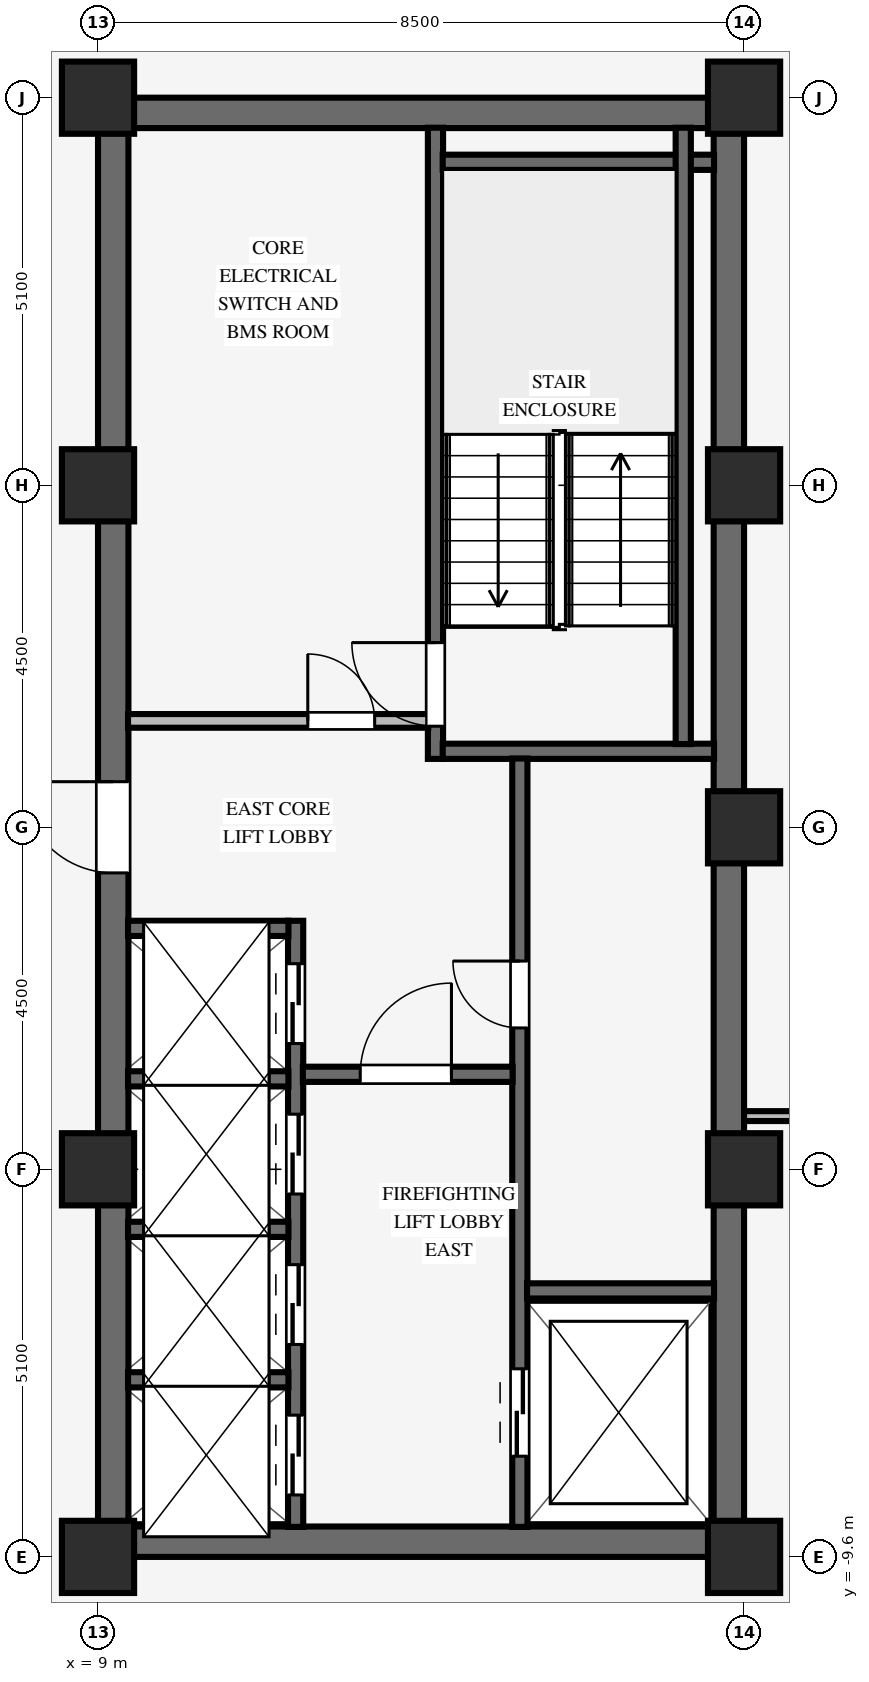
"""IFC4 building model, lengths in metres.
Left out: names, types, materials, properties, quantities, classifications, styles, units other than length and angle.
Written with IfcOpenShell. Run it as: python <this file> out.ifc"""

import sys

from ifc_helpers import new_model, si_unit, direction, frame, frame_2d, origin, origin_2d, place, context, subcontext, project, spatial, rectangle, extrude, source, transform, mapped, element, fill, save


model = new_model("IFC4")
c1 = context("Model", 3, precision=1e-05, world=origin(), true_north=direction((0.0, 1.0)))
c2 = subcontext(c1, "Body", "Model", "MODEL_VIEW")
j1 = project(units=[si_unit("LENGTHUNIT", "METRE"), si_unit("PLANEANGLEUNIT", "RADIAN")], contexts=[c1])
p1 = place(None, origin())
s1 = spatial("IfcSite", under=j1, at=p1, CompositionType="ELEMENT")
p2 = place(p1, origin())
s2 = spatial("IfcBuilding", under=s1, at=p2, CompositionType="ELEMENT")
p3 = place(p2, frame((0.0, 0.0, 178.6)))
s3 = spatial("IfcBuildingStorey", under=s2, at=p3, CompositionType="ELEMENT", Elevation=178.6)
for number, where, z_axis, x_axis in (
    (1, (9.0, -9.4, 0.0), (0.0, 0.0, 1.0), (1.0, 0.0, 0.0)),
    (2, (9.0, 9.4, 0.0), (0.0, 0.0, 1.0), (1.0, 0.0, 0.0)),
):
    element("IfcWall", number, at=place(p3, frame(where, z_axis=z_axis, x_axis=x_axis)), inside=s3, PredefinedType="SHEAR", context=c2, shape_type="SweptSolid", body=[
        extrude(rectangle(XDim=8.5, YDim=0.4, at=frame_2d((4.25, 0.0))), origin(), (0.0, 0.0, 1.0), 3.37),
    ])
p4 = place(p3, frame((9.2, -9.205, 0.0), z_axis=(0.0, 0.0, 1.0), x_axis=(0.0, 1.0, 0.0)))
e3 = element("IfcWall", 3, at=p4, inside=s3, PredefinedType="SHEAR", context=c2, shape_type="SweptSolid", body=[
    extrude(rectangle(XDim=18.41, YDim=0.4, at=frame_2d((9.205, 0.0))), origin(), (0.0, 0.0, 1.0), 3.37),
])
p5 = place(p4, frame((8.605, 0.0, 0.0)))
e4 = element("IfcOpeningElement", 4, at=p5, cuts=e3, PredefinedType="OPENING", context=c2, shape_type="SweptSolid", body=[
    extrude(rectangle(XDim=1.2, YDim=2.15, at=frame_2d((0.6, 1.075))), frame((0.0, 0.21, 0.0), z_axis=(0.0, -1.0, 0.0), x_axis=(1.0, 0.0, 0.0)), (0.0, 0.0, 1.0), 0.42),
])
p6 = place(p3, frame((17.3, -9.205, 0.0), z_axis=(0.0, 0.0, 1.0), x_axis=(0.0, 1.0, 0.0)))
e5 = element("IfcWall", 5, at=p6, inside=s3, PredefinedType="SHEAR", context=c2, shape_type="SweptSolid", body=[
    extrude(rectangle(XDim=18.41, YDim=0.4, at=frame_2d((9.205, 0.0))), origin(), (0.0, 0.0, 1.0), 3.37),
])
for number, where, z_axis, x_axis in (
    (6, (9.0, -9.6, 0.0), (0.0, 0.0, 1.0), (1.0, 0.0, 0.0)),
    (7, (9.0, -4.5, 0.0), (0.0, 0.0, 1.0), (1.0, 0.0, 0.0)),
    (8, (9.0, 4.5, 0.0), (0.0, 0.0, 1.0), (1.0, 0.0, 0.0)),
    (9, (9.0, 9.6, 0.0), (0.0, 0.0, 1.0), (1.0, 0.0, 0.0)),
    (10, (17.5, -9.6, 0.0), (0.0, 0.0, 1.0), (1.0, 0.0, 0.0)),
    (11, (17.5, -4.5, 0.0), (0.0, 0.0, 1.0), (1.0, 0.0, 0.0)),
    (12, (17.5, 4.5, 0.0), (0.0, 0.0, 1.0), (1.0, 0.0, 0.0)),
    (13, (17.5, 9.6, 0.0), (0.0, 0.0, 1.0), (1.0, 0.0, 0.0)),
    (14, (17.5, 0.0, 0.0), (0.0, 0.0, 1.0), (1.0, 0.0, 0.0)),
):
    element("IfcColumn", number, at=place(p3, frame(where, z_axis=z_axis, x_axis=x_axis)), inside=s3, PredefinedType="COLUMN", context=c2, shape_type="SweptSolid", body=[
        extrude(rectangle(XDim=0.95, YDim=0.95, at=origin_2d()), origin(), (0.0, 0.0, 1.0), 3.37),
    ])
p7 = place(p3, frame((13.44, 0.9, 0.0), z_axis=(0.0, 0.0, 1.0), x_axis=(0.0, 1.0, 0.0)))
e15 = element("IfcWall", 15, at=p7, inside=s3, PredefinedType="SHEAR", context=c2, shape_type="SweptSolid", body=[
    extrude(rectangle(XDim=8.305, YDim=0.2, at=frame_2d((4.153, 0.0))), origin(), (0.0, 0.0, 1.0), 3.37),
])
p8 = place(p7, frame((0.43, 0.0, 0.0)))
e16 = element("IfcOpeningElement", 16, at=p8, cuts=e15, PredefinedType="OPENING", context=c2, shape_type="SweptSolid", body=[
    extrude(rectangle(XDim=1.1, YDim=2.15, at=frame_2d((0.55, 1.075))), frame((0.0, 0.11, 0.0), z_axis=(0.0, -1.0, 0.0), x_axis=(1.0, 0.0, 0.0)), (0.0, 0.0, 1.0), 0.22),
])
for number, where, z_axis, x_axis in (
    (17, (13.535, 1.0, 0.0), (0.0, 0.0, 1.0), (1.0, 0.0, 0.0)),
    (18, (13.535, 8.75, 0.0), (0.0, 0.0, 1.0), (1.0, 0.0, 0.0)),
):
    element("IfcWall", number, at=place(p3, frame(where, z_axis=z_axis, x_axis=x_axis)), inside=s3, PredefinedType="SHEAR", context=c2, shape_type="SweptSolid", body=[
        extrude(rectangle(XDim=3.57, YDim=0.2, at=frame_2d((1.785, 0.0))), origin(), (0.0, 0.0, 1.0), 3.37),
    ])
p9 = place(p3, frame((16.7, 1.095, 0.0), z_axis=(0.0, 0.0, 1.0), x_axis=(0.0, 1.0, 0.0)))
e19 = element("IfcWall", 19, at=p9, inside=s3, PredefinedType="SHEAR", context=c2, shape_type="SweptSolid", body=[
    extrude(rectangle(XDim=8.11, YDim=0.2, at=frame_2d((4.055, 0.0))), origin(), (0.0, 0.0, 1.0), 3.37),
])
p10 = place(p3, frame((14.55, -9.205, 0.0), z_axis=(0.0, 0.0, 1.0), x_axis=(0.0, 1.0, 0.0)))
e20 = element("IfcWall", 20, at=p10, inside=s3, PredefinedType="SHEAR", context=c2, shape_type="SweptSolid", body=[
    extrude(rectangle(XDim=10.11, YDim=0.2, at=frame_2d((5.055, 0.0))), origin(), (0.0, 0.0, 1.0), 3.37),
])
p11 = place(p10, frame((6.565, 0.0, 0.0)))
e21 = element("IfcOpeningElement", 21, at=p11, cuts=e20, PredefinedType="OPENING", context=c2, shape_type="SweptSolid", body=[
    extrude(rectangle(XDim=0.88, YDim=2.1, at=frame_2d((0.44, 1.05))), frame((0.0, 0.11, 0.0), z_axis=(0.0, -1.0, 0.0), x_axis=(1.0, 0.0, 0.0)), (0.0, 0.0, 1.0), 0.22),
])
p12 = place(p10, frame((0.93, 0.0, 0.0)))
e22 = element("IfcOpeningElement", 22, at=p12, cuts=e20, PredefinedType="OPENING", context=c2, shape_type="SweptSolid", body=[
    extrude(rectangle(XDim=1.15, YDim=2.15, at=frame_2d((0.575, 1.075))), frame((0.0, 0.11, 0.0), z_axis=(0.0, -1.0, 0.0), x_axis=(1.0, 0.0, 0.0)), (0.0, 0.0, 1.0), 0.22),
])
p13 = place(p3, frame((14.645, -6.1, 0.0), z_axis=(0.0, 0.0, 1.0), x_axis=(1.0, 0.0, 0.0)))
e23 = element("IfcWall", 23, at=p13, inside=s3, PredefinedType="SHEAR", context=c2, shape_type="SweptSolid", body=[
    extrude(rectangle(XDim=2.46, YDim=0.2, at=frame_2d((1.23, 0.0))), origin(), (0.0, 0.0, 1.0), 3.37),
])
p14 = place(p3, frame((11.6, -9.205, 0.0), z_axis=(0.0, 0.0, 1.0), x_axis=(0.0, 1.0, 0.0)))
e24 = element("IfcWall", 24, at=p14, inside=s3, PredefinedType="SHEAR", context=c2, shape_type="SweptSolid", body=[
    extrude(rectangle(XDim=7.975, YDim=0.2, at=frame_2d((3.988, 0.0))), origin(), (0.0, 0.0, 1.0), 3.37),
])
p15 = place(p14, frame((0.42, 0.0, 0.0)))
e25 = element("IfcOpeningElement", 25, at=p15, cuts=e24, PredefinedType="OPENING", context=c2, shape_type="SweptSolid", body=[
    extrude(rectangle(XDim=1.05, YDim=2.15, at=frame_2d((0.525, 1.075))), frame((0.0, 0.11, 0.0), z_axis=(0.0, -1.0, 0.0), x_axis=(1.0, 0.0, 0.0)), (0.0, 0.0, 1.0), 0.22),
])
p16 = place(p14, frame((2.4, 0.0, 0.0)))
e26 = element("IfcOpeningElement", 26, at=p16, cuts=e24, PredefinedType="OPENING", context=c2, shape_type="SweptSolid", body=[
    extrude(rectangle(XDim=1.05, YDim=2.15, at=frame_2d((0.525, 1.075))), frame((0.0, 0.11, 0.0), z_axis=(0.0, -1.0, 0.0), x_axis=(1.0, 0.0, 0.0)), (0.0, 0.0, 1.0), 0.22),
])
p17 = place(p14, frame((4.38, 0.0, 0.0)))
e27 = element("IfcOpeningElement", 27, at=p17, cuts=e24, PredefinedType="OPENING", context=c2, shape_type="SweptSolid", body=[
    extrude(rectangle(XDim=1.05, YDim=2.15, at=frame_2d((0.525, 1.075))), frame((0.0, 0.11, 0.0), z_axis=(0.0, -1.0, 0.0), x_axis=(1.0, 0.0, 0.0)), (0.0, 0.0, 1.0), 0.22),
])
p18 = place(p14, frame((6.36, 0.0, 0.0)))
e28 = element("IfcOpeningElement", 28, at=p18, cuts=e24, PredefinedType="OPENING", context=c2, shape_type="SweptSolid", body=[
    extrude(rectangle(XDim=1.05, YDim=2.15, at=frame_2d((0.525, 1.075))), frame((0.0, 0.11, 0.0), z_axis=(0.0, -1.0, 0.0), x_axis=(1.0, 0.0, 0.0)), (0.0, 0.0, 1.0), 0.22),
])
p19 = place(p3, frame((11.695, -3.25, 0.0), z_axis=(0.0, 0.0, 1.0), x_axis=(1.0, 0.0, 0.0)))
e29 = element("IfcWall", 29, at=p19, inside=s3, PredefinedType="SHEAR", context=c2, shape_type="SweptSolid", body=[
    extrude(rectangle(XDim=2.76, YDim=0.2, at=frame_2d((1.38, 0.0))), origin(), (0.0, 0.0, 1.0), 3.37),
])
p20 = place(p19, frame((0.755, 0.0, 0.0)))
e30 = element("IfcOpeningElement", 30, at=p20, cuts=e29, PredefinedType="OPENING", context=c2, shape_type="SweptSolid", body=[
    extrude(rectangle(XDim=1.2, YDim=2.15, at=frame_2d((0.6, 1.075))), frame((0.0, 0.11, 0.0), z_axis=(0.0, -1.0, 0.0), x_axis=(1.0, 0.0, 0.0)), (0.0, 0.0, 1.0), 0.22),
])
for number, where, z_axis, x_axis in (
    (31, (9.395, -7.27, 0.0), (0.0, 0.0, 1.0), (1.0, 0.0, 0.0)),
    (32, (9.395, -5.29, 0.0), (0.0, 0.0, 1.0), (1.0, 0.0, 0.0)),
    (33, (9.395, -3.31, 0.0), (0.0, 0.0, 1.0), (1.0, 0.0, 0.0)),
    (34, (9.395, -1.33, 0.0), (0.0, 0.0, 1.0), (1.0, 0.0, 0.0)),
):
    element("IfcWall", number, at=place(p3, frame(where, z_axis=z_axis, x_axis=x_axis)), inside=s3, PredefinedType="SHEAR", context=c2, shape_type="SweptSolid", body=[
        extrude(rectangle(XDim=2.11, YDim=0.2, at=frame_2d((1.055, 0.0))), origin(), (0.0, 0.0, 1.0), 3.37),
    ])
p21 = place(p3, frame((9.395, 1.4, 0.0), z_axis=(0.0, 0.0, 1.0), x_axis=(1.0, 0.0, 0.0)))
e35 = element("IfcWall", 35, at=p21, inside=s3, PredefinedType="PARTITIONING", context=c2, shape_type="SweptSolid", body=[
    extrude(rectangle(XDim=3.95, YDim=0.18, at=frame_2d((1.975, 0.0))), origin(), (0.0, 0.0, 1.0), 3.36),
])
p22 = place(p21, frame((2.365, 0.0, 0.0)))
e36 = element("IfcOpeningElement", 36, at=p22, cuts=e35, PredefinedType="OPENING", context=c2, shape_type="SweptSolid", body=[
    extrude(rectangle(XDim=0.88, YDim=2.1, at=frame_2d((0.44, 1.05))), frame((0.0, 0.1, 0.0), z_axis=(0.0, -1.0, 0.0), x_axis=(1.0, 0.0, 0.0)), (0.0, 0.0, 1.0), 0.2),
])
p23 = place(p3, frame((17.5, -3.8, 0.0), z_axis=(0.0, 0.0, 1.0), x_axis=(1.0, 0.0, 0.0)))
e37 = element("IfcWall", 37, at=p23, inside=s3, PredefinedType="PARTITIONING", context=c2, shape_type="SweptSolid", body=[
    extrude(rectangle(XDim=4.79, YDim=0.13, at=frame_2d((2.395, 0.0))), origin(), (0.0, 0.0, 1.0), 3.36),
])
m1 = source(origin(), c2, "Body", "SweptSolid", [
    extrude(rectangle(XDim=1.1, YDim=2.15, at=frame_2d((0.55, 1.075))), frame((0.0, 0.025, 0.0), z_axis=(0.0, -1.0, 0.0), x_axis=(1.0, 0.0, 0.0)), (0.0, 0.0, 1.0), 0.05),
])
p24 = place(p8, origin())
e38 = element("IfcDoor", 38, at=p24, inside=s3, OperationType="SINGLE_SWING_RIGHT", PredefinedType="DOOR", context=c2, shape_type="MappedRepresentation", body=[
    mapped(m1, transform((0.0, 0.0, 0.0), scale=1.0)),
])
fill(e16, e38)
m2 = source(origin(), c2, "Body", "SweptSolid", [
    extrude(rectangle(XDim=0.88, YDim=2.1, at=frame_2d((0.44, 1.05))), frame((0.0, 0.025, 0.0), z_axis=(0.0, -1.0, 0.0), x_axis=(1.0, 0.0, 0.0)), (0.0, 0.0, 1.0), 0.05),
])
p25 = place(p11, origin())
e39 = element("IfcDoor", 39, at=p25, inside=s3, OperationType="SINGLE_SWING_RIGHT", PredefinedType="DOOR", context=c2, shape_type="MappedRepresentation", body=[
    mapped(m2, transform((0.0, 0.0, 0.0), scale=1.0)),
])
fill(e21, e39)
m3 = source(origin(), c2, "Body", "SweptSolid", [
    extrude(rectangle(XDim=1.2, YDim=2.15, at=frame_2d((0.6, 1.075))), frame((0.0, 0.025, 0.0), z_axis=(0.0, -1.0, 0.0), x_axis=(1.0, 0.0, 0.0)), (0.0, 0.0, 1.0), 0.05),
])
p26 = place(p20, origin())
e40 = element("IfcDoor", 40, at=p26, inside=s3, OperationType="SINGLE_SWING_RIGHT", PredefinedType="DOOR", context=c2, shape_type="MappedRepresentation", body=[
    mapped(m3, transform((0.0, 0.0, 0.0), scale=1.0)),
])
fill(e30, e40)
p27 = place(p5, origin())
e41 = element("IfcDoor", 41, at=p27, inside=s3, OperationType="SINGLE_SWING_RIGHT", PredefinedType="DOOR", context=c2, shape_type="MappedRepresentation", body=[
    mapped(m3, transform((0.0, 0.0, 0.0), scale=1.0)),
])
fill(e4, e41)
p28 = place(p22, origin())
e42 = element("IfcDoor", 42, at=p28, inside=s3, OperationType="SINGLE_SWING_LEFT", PredefinedType="DOOR", context=c2, shape_type="MappedRepresentation", body=[
    mapped(m2, transform((0.0, 0.0, 0.0), scale=1.0)),
])
fill(e36, e42)
m4 = source(origin(), c2, "Body", "SweptSolid", [
    extrude(rectangle(XDim=1.15, YDim=2.15, at=frame_2d((0.575, 1.075))), frame((0.0, 0.025, 0.0), z_axis=(0.0, -1.0, 0.0), x_axis=(1.0, 0.0, 0.0)), (0.0, 0.0, 1.0), 0.05),
])
p29 = place(p12, origin())
e43 = element("IfcDoor", 43, at=p29, inside=s3, OperationType="DOUBLE_DOOR_SLIDING", PredefinedType="DOOR", context=c2, shape_type="MappedRepresentation", body=[
    mapped(m4, transform((0.0, 0.0, 0.0), scale=1.0)),
])
fill(e22, e43)
m5 = source(origin(), c2, "Body", "SweptSolid", [
    extrude(rectangle(XDim=1.05, YDim=2.15, at=frame_2d((0.525, 1.075))), frame((0.0, 0.025, 0.0), z_axis=(0.0, -1.0, 0.0), x_axis=(1.0, 0.0, 0.0)), (0.0, 0.0, 1.0), 0.05),
])
p30 = place(p15, origin())
e44 = element("IfcDoor", 44, at=p30, inside=s3, OperationType="DOUBLE_DOOR_SLIDING", PredefinedType="DOOR", context=c2, shape_type="MappedRepresentation", body=[
    mapped(m5, transform((0.0, 0.0, 0.0), scale=1.0)),
])
fill(e25, e44)
p31 = place(p16, origin())
e45 = element("IfcDoor", 45, at=p31, inside=s3, OperationType="DOUBLE_DOOR_SLIDING", PredefinedType="DOOR", context=c2, shape_type="MappedRepresentation", body=[
    mapped(m5, transform((0.0, 0.0, 0.0), scale=1.0)),
])
fill(e26, e45)
p32 = place(p17, origin())
e46 = element("IfcDoor", 46, at=p32, inside=s3, OperationType="DOUBLE_DOOR_SLIDING", PredefinedType="DOOR", context=c2, shape_type="MappedRepresentation", body=[
    mapped(m5, transform((0.0, 0.0, 0.0), scale=1.0)),
])
fill(e27, e46)
p33 = place(p18, origin())
e47 = element("IfcDoor", 47, at=p33, inside=s3, OperationType="DOUBLE_DOOR_SLIDING", PredefinedType="DOOR", context=c2, shape_type="MappedRepresentation", body=[
    mapped(m5, transform((0.0, 0.0, 0.0), scale=1.0)),
])
fill(e28, e47)
save(model, sys.argv[1])
